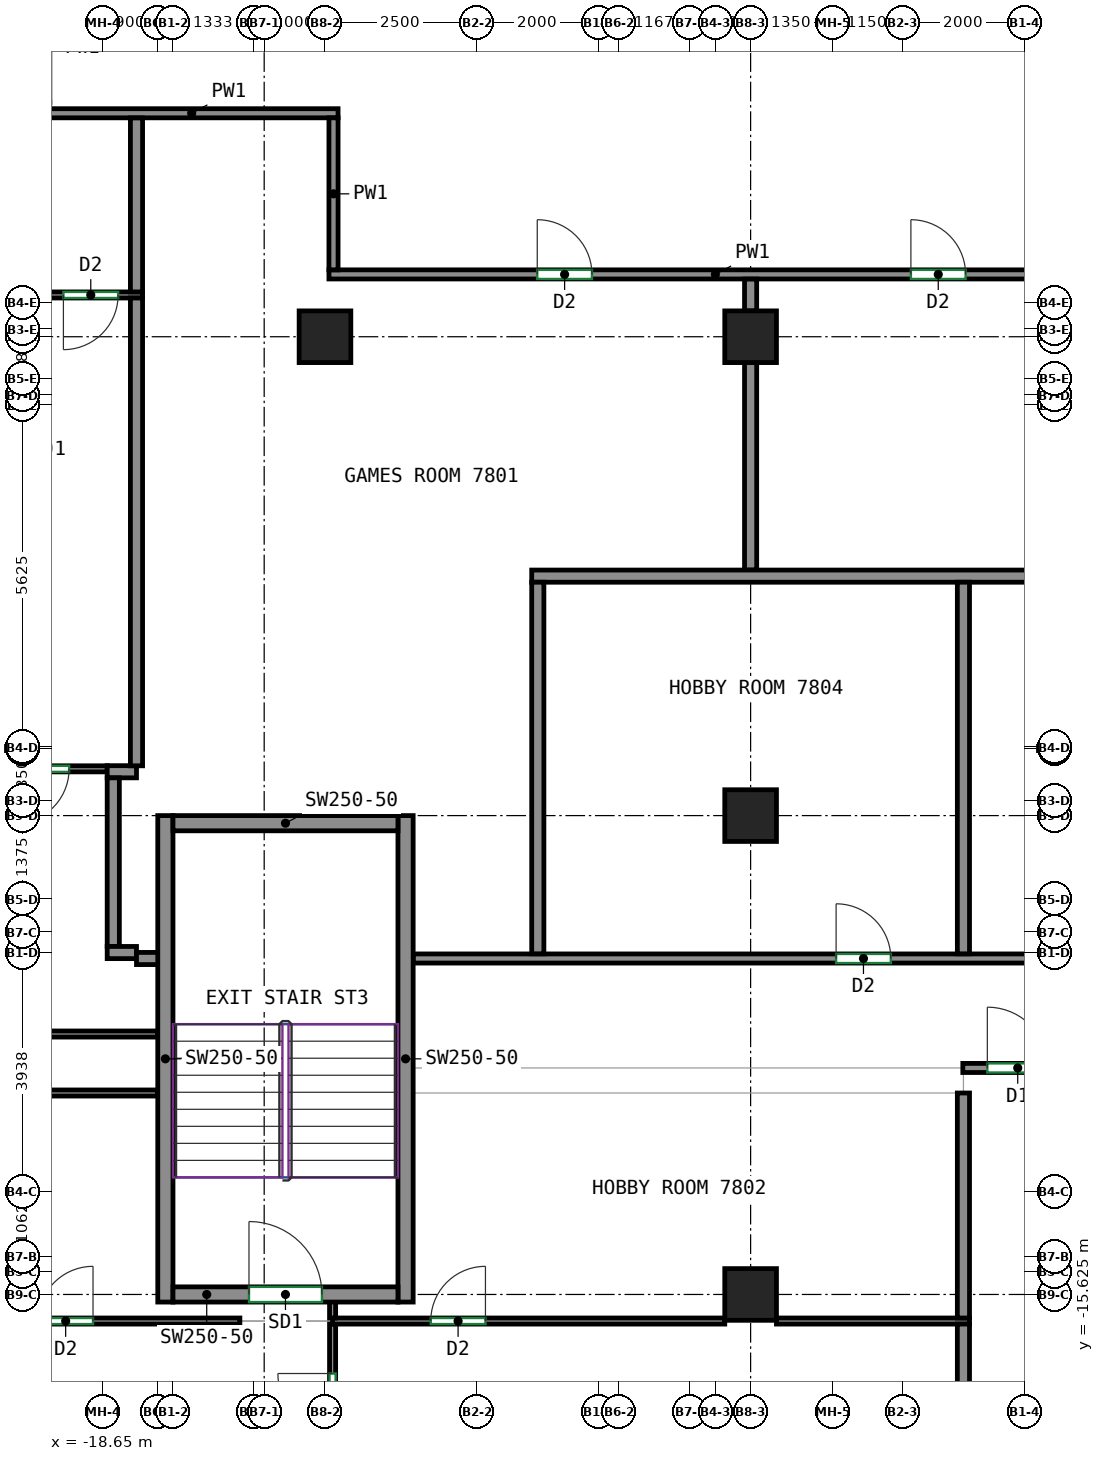
"""IFC4 building model, lengths in metres.
Left out: names, types, materials, properties, quantities, classifications, styles, units other than length and angle.
Written with IfcOpenShell. Run it as: python <this file> out.ifc"""

import sys

from ifc_helpers import new_model, si_unit, direction, frame, frame_2d, origin, origin_2d, place, context, subcontext, project, spatial, rectangle, extrude, source, transform, mapped, element, fill, save


model = new_model("IFC4")
c1 = context("Model", 3, precision=1e-05, world=origin(), true_north=direction((0.0, 1.0)))
c2 = subcontext(c1, "Body", "Model", "MODEL_VIEW")
j1 = project(units=[si_unit("LENGTHUNIT", "METRE"), si_unit("PLANEANGLEUNIT", "RADIAN")], contexts=[c1])
p1 = place(None, origin())
s1 = spatial("IfcSite", under=j1, at=p1, CompositionType="ELEMENT")
p2 = place(p1, origin())
s2 = spatial("IfcBuilding", under=s1, at=p2, CompositionType="ELEMENT")
p3 = place(p2, frame((0.0, 0.0, 312.0)))
s3 = spatial("IfcBuildingStorey", under=s2, at=p3, CompositionType="ELEMENT", Elevation=312.0)
m1 = source(origin(), c2, "Body", "SweptSolid", [
    extrude(rectangle(XDim=0.85, YDim=0.85, at=origin_2d()), origin(), (0.0, 0.0, 1.0), 3.12),
])
for number, where, z_axis, x_axis in (
    (1, (-15.0, 0.125, 0.0), (0.0, 0.0, 1.0), (1.0, 0.0, 0.0)),
    (2, (-8.0, -15.625, 0.0), (0.0, 0.0, 1.0), (1.0, 0.0, 0.0)),
    (3, (-8.0, -7.75, 0.0), (0.0, 0.0, 1.0), (1.0, 0.0, 0.0)),
    (4, (-8.0, 0.125, 0.0), (0.0, 0.0, 1.0), (1.0, 0.0, 0.0)),
):
    element("IfcColumn", number, at=place(p3, frame(where, z_axis=z_axis, x_axis=x_axis)), inside=s3, PredefinedType="COLUMN", context=c2, shape_type="MappedRepresentation", body=[
        mapped(m1, transform((0.0, 0.0, 0.0))),
    ])
m2 = source(origin(), c2, "Body", "SweptSolid", [
    extrude(rectangle(XDim=8.0, YDim=0.25, at=frame_2d((4.0, 0.0))), origin(), (0.0, 0.0, 1.0), 3.12),
])
for number, where, z_axis, x_axis in (
    (5, (-17.625, -15.75, 0.0), (0.0, 0.0, 1.0), (0.0, 1.0, 0.0)),
    (6, (-13.675, -15.75, 0.0), (0.0, 0.0, 1.0), (0.0, 1.0, 0.0)),
):
    element("IfcWall", number, at=place(p3, frame(where, z_axis=z_axis, x_axis=x_axis)), inside=s3, PredefinedType="SHEAR", context=c2, shape_type="MappedRepresentation", body=[
        mapped(m2, transform((0.0, 0.0, 0.0))),
    ])
m3 = source(origin(), c2, "Body", "SweptSolid", [
    extrude(rectangle(XDim=3.7, YDim=0.25, at=frame_2d((1.85, 0.0))), origin(), (0.0, 0.0, 1.0), 3.12),
])
p4 = place(p3, frame((-17.5, -15.625, 0.0), z_axis=(0.0, 0.0, 1.0), x_axis=(1.0, 0.0, 0.0)))
e7 = element("IfcWall", 7, at=p4, inside=s3, PredefinedType="SHEAR", context=c2, shape_type="MappedRepresentation", body=[
    mapped(m3, transform((0.0, 0.0, 0.0))),
])
p5 = place(p4, frame((1.25, 0.0, 0.0)))
e8 = element("IfcOpeningElement", 8, at=p5, cuts=e7, PredefinedType="OPENING", context=c2, shape_type="SweptSolid", body=[
    extrude(rectangle(XDim=1.2, YDim=2.1, at=frame_2d((0.6, 1.05))), frame((0.0, 0.135, 0.0), z_axis=(0.0, -1.0, 0.0), x_axis=(1.0, 0.0, 0.0)), (0.0, 0.0, 1.0), 0.27),
])
p6 = place(p3, frame((-17.5, -7.875, 0.0), z_axis=(0.0, 0.0, 1.0), x_axis=(1.0, 0.0, 0.0)))
e9 = element("IfcWall", 9, at=p6, inside=s3, PredefinedType="SHEAR", context=c2, shape_type="MappedRepresentation", body=[
    mapped(m3, transform((0.0, 0.0, 0.0))),
])
p7 = place(p3, frame((-19.6, 3.8, 0.0), z_axis=(0.0, 0.0, 1.0), x_axis=(1.0, 0.0, 0.0)))
e10 = element("IfcWall", 10, at=p7, inside=s3, PredefinedType="PARTITIONING", context=c2, shape_type="SweptSolid", body=[
    extrude(rectangle(XDim=4.815, YDim=0.15, at=frame_2d((2.408, 0.0))), origin(), (0.0, 0.0, 1.0), 3.12),
])
p8 = place(p3, frame((-4.51, -11.9, 0.0), z_axis=(0.0, 0.0, 1.0), x_axis=(1.0, 0.0, 0.0)))
e11 = element("IfcWall", 11, at=p8, inside=s3, PredefinedType="PARTITIONING", context=c2, shape_type="SweptSolid", body=[
    extrude(rectangle(XDim=22.26, YDim=0.15, at=frame_2d((11.13, 0.0))), origin(), (0.0, 0.0, 1.0), 3.12),
])
p9 = place(p8, frame((0.403, 0.0, 0.0)))
e12 = element("IfcOpeningElement", 12, at=p9, cuts=e11, PredefinedType="OPENING", context=c2, shape_type="SweptSolid", body=[
    extrude(rectangle(XDim=1.0, YDim=2.1, at=frame_2d((0.5, 1.05))), frame((0.0, 0.085, 0.0), z_axis=(0.0, -1.0, 0.0), x_axis=(1.0, 0.0, 0.0)), (0.0, 0.0, 1.0), 0.17),
])
p10 = place(p3, frame((-14.935, 1.15, 0.0), z_axis=(0.0, 0.0, 1.0), x_axis=(1.0, 0.0, 0.0)))
e13 = element("IfcWall", 13, at=p10, inside=s3, PredefinedType="PARTITIONING", context=c2, shape_type="SweptSolid", body=[
    extrude(rectangle(XDim=12.71, YDim=0.15, at=frame_2d((6.355, 0.0))), origin(), (0.0, 0.0, 1.0), 3.12),
])
p11 = place(p10, frame((3.426, 0.0, 0.0)))
e14 = element("IfcOpeningElement", 14, at=p11, cuts=e13, PredefinedType="OPENING", context=c2, shape_type="SweptSolid", body=[
    extrude(rectangle(XDim=0.9, YDim=2.1, at=frame_2d((0.45, 1.05))), frame((0.0, 0.085, 0.0), z_axis=(0.0, -1.0, 0.0), x_axis=(1.0, 0.0, 0.0)), (0.0, 0.0, 1.0), 0.17),
])
p12 = place(p10, frame((9.571, 0.0, 0.0)))
e15 = element("IfcOpeningElement", 15, at=p12, cuts=e13, PredefinedType="OPENING", context=c2, shape_type="SweptSolid", body=[
    extrude(rectangle(XDim=0.9, YDim=2.1, at=frame_2d((0.45, 1.05))), frame((0.0, 0.085, 0.0), z_axis=(0.0, -1.0, 0.0), x_axis=(1.0, 0.0, 0.0)), (0.0, 0.0, 1.0), 0.17),
])
p13 = place(p3, frame((-14.86, 3.725, 0.0), z_axis=(0.0, 0.0, 1.0), x_axis=(0.0, -1.0, 0.0)))
e16 = element("IfcWall", 16, at=p13, inside=s3, PredefinedType="PARTITIONING", context=c2, shape_type="SweptSolid", body=[
    extrude(rectangle(XDim=2.5, YDim=0.15, at=frame_2d((1.25, 0.0))), origin(), (0.0, 0.0, 1.0), 3.12),
])
p14 = place(p3, frame((-13.55, -10.1, 0.0), z_axis=(0.0, 0.0, 1.0), x_axis=(1.0, 0.0, 0.0)))
e17 = element("IfcWall", 17, at=p14, inside=s3, PredefinedType="PARTITIONING", context=c2, shape_type="SweptSolid", body=[
    extrude(rectangle(XDim=30.65, YDim=0.15, at=frame_2d((15.325, 0.0))), origin(), (0.0, 0.0, 1.0), 3.12),
])
p15 = place(p14, frame((6.956, 0.0, 0.0)))
e18 = element("IfcOpeningElement", 18, at=p15, cuts=e17, PredefinedType="OPENING", context=c2, shape_type="SweptSolid", body=[
    extrude(rectangle(XDim=0.9, YDim=2.1, at=frame_2d((0.45, 1.05))), frame((0.0, 0.085, 0.0), z_axis=(0.0, -1.0, 0.0), x_axis=(1.0, 0.0, 0.0)), (0.0, 0.0, 1.0), 0.17),
])
p16 = place(p14, frame((10.643, 0.0, 0.0)))
e19 = element("IfcOpeningElement", 19, at=p16, cuts=e17, PredefinedType="OPENING", context=c2, shape_type="SweptSolid", body=[
    extrude(rectangle(XDim=0.9, YDim=2.1, at=frame_2d((0.45, 1.05))), frame((0.0, 0.085, 0.0), z_axis=(0.0, -1.0, 0.0), x_axis=(1.0, 0.0, 0.0)), (0.0, 0.0, 1.0), 0.17),
])
p17 = place(p14, frame((24.155, 0.0, 0.0)))
e20 = element("IfcOpeningElement", 20, at=p17, cuts=e17, PredefinedType="OPENING", context=c2, shape_type="SweptSolid", body=[
    extrude(rectangle(XDim=0.9, YDim=2.1, at=frame_2d((0.45, 1.05))), frame((0.0, 0.085, 0.0), z_axis=(0.0, -1.0, 0.0), x_axis=(1.0, 0.0, 0.0)), (0.0, 0.0, 1.0), 0.17),
])
p18 = place(p3, frame((-14.875, -19.762, 0.0), z_axis=(0.0, 0.0, 1.0), x_axis=(0.0, 1.0, 0.0)))
e21 = element("IfcWall", 21, at=p18, inside=s3, PredefinedType="PARTITIONING", context=c2, shape_type="SweptSolid", body=[
    extrude(rectangle(XDim=3.65, YDim=0.1, at=frame_2d((1.825, 0.0))), origin(), (0.0, 0.0, 1.0), 3.12),
])
p19 = place(p18, frame((1.937, 0.0, 0.0)))
e22 = element("IfcOpeningElement", 22, at=p19, cuts=e21, PredefinedType="OPENING", context=c2, shape_type="SweptSolid", body=[
    extrude(rectangle(XDim=0.9, YDim=2.1, at=frame_2d((0.45, 1.05))), frame((0.0, 0.06, 0.0), z_axis=(0.0, -1.0, 0.0), x_axis=(1.0, 0.0, 0.0)), (0.0, 0.0, 1.0), 0.12),
])
p20 = place(p3, frame((-25.25, -16.062, 0.0), z_axis=(0.0, 0.0, 1.0), x_axis=(1.0, 0.0, 0.0)))
e23 = element("IfcWall", 23, at=p20, inside=s3, PredefinedType="PARTITIONING", context=c2, shape_type="SweptSolid", body=[
    extrude(rectangle(XDim=8.85, YDim=0.1, at=frame_2d((4.425, 0.0))), origin(), (0.0, 0.0, 1.0), 3.12),
])
p21 = place(p20, frame((5.535, 0.0, 0.0)))
e24 = element("IfcOpeningElement", 24, at=p21, cuts=e23, PredefinedType="OPENING", context=c2, shape_type="SweptSolid", body=[
    extrude(rectangle(XDim=0.9, YDim=2.1, at=frame_2d((0.45, 1.05))), frame((0.0, 0.06, 0.0), z_axis=(0.0, -1.0, 0.0), x_axis=(1.0, 0.0, 0.0)), (0.0, 0.0, 1.0), 0.12),
])
p22 = place(p3, frame((-7.575, -16.062, 0.0), z_axis=(0.0, 0.0, 1.0), x_axis=(1.0, 0.0, 0.0)))
e25 = element("IfcWall", 25, at=p22, inside=s3, PredefinedType="PARTITIONING", context=c2, shape_type="SweptSolid", body=[
    extrude(rectangle(XDim=3.175, YDim=0.1, at=frame_2d((1.587, 0.0))), origin(), (0.0, 0.0, 1.0), 3.12),
])
p23 = place(p3, frame((-14.875, -16.062, 0.0), z_axis=(0.0, 0.0, 1.0), x_axis=(1.0, 0.0, 0.0)))
e26 = element("IfcWall", 26, at=p23, inside=s3, PredefinedType="PARTITIONING", context=c2, shape_type="SweptSolid", body=[
    extrude(rectangle(XDim=6.45, YDim=0.1, at=frame_2d((3.225, 0.0))), origin(), (0.0, 0.0, 1.0), 3.12),
])
p24 = place(p23, frame((1.614, 0.0, 0.0)))
e27 = element("IfcOpeningElement", 27, at=p24, cuts=e26, PredefinedType="OPENING", context=c2, shape_type="SweptSolid", body=[
    extrude(rectangle(XDim=0.9, YDim=2.1, at=frame_2d((0.45, 1.05))), frame((0.0, 0.06, 0.0), z_axis=(0.0, -1.0, 0.0), x_axis=(1.0, 0.0, 0.0)), (0.0, 0.0, 1.0), 0.12),
])
p25 = place(p3, frame((-4.5, -19.762, 0.0), z_axis=(0.0, 0.0, 1.0), x_axis=(0.0, 1.0, 0.0)))
e28 = element("IfcWall", 28, at=p25, inside=s3, PredefinedType="PARTITIONING", context=c2, shape_type="SweptSolid", body=[
    extrude(rectangle(XDim=3.65, YDim=0.2, at=frame_2d((1.825, 0.0))), origin(), (0.0, 0.0, 1.0), 3.12),
])
p26 = place(p3, frame((-14.875, -16.012, 0.0), z_axis=(0.0, 0.0, 1.0), x_axis=(0.0, 1.0, 0.0)))
e29 = element("IfcWall", 29, at=p26, inside=s3, PredefinedType="PARTITIONING", context=c2, shape_type="SweptSolid", body=[
    extrude(rectangle(XDim=0.312, YDim=0.1, at=frame_2d((0.156, 0.0))), origin(), (0.0, 0.0, 1.0), 3.12),
])
p27 = place(p3, frame((-17.75, -12.312, 0.0), z_axis=(0.0, 0.0, 1.0), x_axis=(-1.0, 0.0, 0.0)))
e30 = element("IfcWall", 30, at=p27, inside=s3, PredefinedType="PARTITIONING", context=c2, shape_type="SweptSolid", body=[
    extrude(rectangle(XDim=7.5, YDim=0.1, at=frame_2d((3.75, 0.0))), origin(), (0.0, 0.0, 1.0), 3.12),
])
p28 = place(p27, frame((5.08, 0.0, 0.0)))
e31 = element("IfcOpeningElement", 31, at=p28, cuts=e30, PredefinedType="OPENING", context=c2, shape_type="SweptSolid", body=[
    extrude(rectangle(XDim=1.0, YDim=2.1, at=frame_2d((0.5, 1.05))), frame((0.0, 0.06, 0.0), z_axis=(0.0, -1.0, 0.0), x_axis=(1.0, 0.0, 0.0)), (0.0, 0.0, 1.0), 0.12),
])
p29 = place(p3, frame((-4.5, -16.012, 0.0), z_axis=(0.0, 0.0, 1.0), x_axis=(0.0, 1.0, 0.0)))
e32 = element("IfcWall", 32, at=p29, inside=s3, PredefinedType="PARTITIONING", context=c2, shape_type="SweptSolid", body=[
    extrude(rectangle(XDim=3.7, YDim=0.2, at=frame_2d((1.85, 0.0))), origin(), (0.0, 0.0, 1.0), 3.12),
])
p30 = place(p3, frame((-17.75, -11.342, 0.0), z_axis=(0.0, 0.0, 1.0), x_axis=(-1.0, 0.0, 0.0)))
e33 = element("IfcWall", 33, at=p30, inside=s3, PredefinedType="PARTITIONING", context=c2, shape_type="SweptSolid", body=[
    extrude(rectangle(XDim=7.5, YDim=0.1, at=frame_2d((3.75, 0.0))), origin(), (0.0, 0.0, 1.0), 3.12),
])
p31 = place(p30, frame((3.757, 0.0, 0.0)))
e34 = element("IfcOpeningElement", 34, at=p31, cuts=e33, PredefinedType="OPENING", context=c2, shape_type="SweptSolid", body=[
    extrude(rectangle(XDim=0.9, YDim=2.1, at=frame_2d((0.45, 1.05))), frame((0.0, 0.06, 0.0), z_axis=(0.0, -1.0, 0.0), x_axis=(1.0, 0.0, 0.0)), (0.0, 0.0, 1.0), 0.12),
])
p32 = place(p3, frame((-18.582, -6.981, 0.0), z_axis=(0.0, 0.0, 1.0), x_axis=(-1.0, 0.0, 0.0)))
e35 = element("IfcWall", 35, at=p32, inside=s3, PredefinedType="PARTITIONING", context=c2, shape_type="SweptSolid", body=[
    extrude(rectangle(XDim=6.668, YDim=0.1, at=frame_2d((3.334, 0.0))), origin(), (0.0, 0.0, 1.0), 3.12),
])
p33 = place(p32, frame((0.626, 0.0, 0.0)))
e36 = element("IfcOpeningElement", 36, at=p33, cuts=e35, PredefinedType="OPENING", context=c2, shape_type="SweptSolid", body=[
    extrude(rectangle(XDim=0.9, YDim=2.1, at=frame_2d((0.45, 1.05))), frame((0.0, 0.06, 0.0), z_axis=(0.0, -1.0, 0.0), x_axis=(1.0, 0.0, 0.0)), (0.0, 0.0, 1.0), 0.12),
])
p34 = place(p3, frame((-18.582, -7.029, 0.0), z_axis=(0.0, 0.0, 1.0), x_axis=(1.0, 0.0, 0.0)))
e37 = element("IfcWall", 37, at=p34, inside=s3, PredefinedType="PARTITIONING", context=c2, shape_type="SweptSolid", body=[
    extrude(rectangle(XDim=0.482, YDim=0.2, at=frame_2d((0.241, 0.0))), origin(), (0.0, 0.0, 1.0), 3.12),
])
p35 = place(p3, frame((-18.482, -9.902, 0.0), z_axis=(0.0, 0.0, 1.0), x_axis=(0.0, 1.0, 0.0)))
e38 = element("IfcWall", 38, at=p35, inside=s3, PredefinedType="PARTITIONING", context=c2, shape_type="SweptSolid", body=[
    extrude(rectangle(XDim=2.773, YDim=0.2, at=frame_2d((1.387, 0.0))), origin(), (0.0, 0.0, 1.0), 3.12),
])
p36 = place(p3, frame((-18.1, -10.002, 0.0), z_axis=(0.0, 0.0, 1.0), x_axis=(-1.0, 0.0, 0.0)))
e39 = element("IfcWall", 39, at=p36, inside=s3, PredefinedType="PARTITIONING", context=c2, shape_type="SweptSolid", body=[
    extrude(rectangle(XDim=0.482, YDim=0.2, at=frame_2d((0.241, 0.0))), origin(), (0.0, 0.0, 1.0), 3.12),
])
p37 = place(p3, frame((-17.7, -10.1, 0.0), z_axis=(0.0, 0.0, 1.0), x_axis=(-1.0, 0.0, 0.0)))
e40 = element("IfcWall", 40, at=p37, inside=s3, PredefinedType="PARTITIONING", context=c2, shape_type="SweptSolid", body=[
    extrude(rectangle(XDim=0.4, YDim=0.2, at=frame_2d((0.2, 0.0))), origin(), (0.0, 0.0, 1.0), 3.12),
])
p38 = place(p3, frame((-18.0, 0.812, 0.0), z_axis=(0.0, 0.0, 1.0), x_axis=(-1.0, 0.0, 0.0)))
e41 = element("IfcWall", 41, at=p38, inside=s3, PredefinedType="PARTITIONING", context=c2, shape_type="SweptSolid", body=[
    extrude(rectangle(XDim=7.25, YDim=0.1, at=frame_2d((3.625, 0.0))), origin(), (0.0, 0.0, 1.0), 3.12),
])
p39 = place(p38, frame((0.402, 0.0, 0.0)))
e42 = element("IfcOpeningElement", 42, at=p39, cuts=e41, PredefinedType="OPENING", context=c2, shape_type="SweptSolid", body=[
    extrude(rectangle(XDim=0.9, YDim=2.1, at=frame_2d((0.45, 1.05))), frame((0.0, 0.06, 0.0), z_axis=(0.0, -1.0, 0.0), x_axis=(1.0, 0.0, 0.0)), (0.0, 0.0, 1.0), 0.12),
])
p40 = place(p3, frame((-18.1, -6.931, 0.0), z_axis=(0.0, 0.0, 1.0), x_axis=(0.0, 1.0, 0.0)))
e43 = element("IfcWall", 43, at=p40, inside=s3, PredefinedType="PARTITIONING", context=c2, shape_type="SweptSolid", body=[
    extrude(rectangle(XDim=7.693, YDim=0.2, at=frame_2d((3.846, 0.0))), origin(), (0.0, 0.0, 1.0), 3.12),
])
p41 = place(p3, frame((-18.1, 0.862, 0.0), z_axis=(0.0, 0.0, 1.0), x_axis=(0.0, 1.0, 0.0)))
e44 = element("IfcWall", 44, at=p41, inside=s3, PredefinedType="PARTITIONING", context=c2, shape_type="SweptSolid", body=[
    extrude(rectangle(XDim=2.861, YDim=0.2, at=frame_2d((1.43, 0.0))), origin(), (0.0, 0.0, 1.0), 3.12),
])
p42 = place(p3, frame((-8.0, 0.55, 0.0), z_axis=(0.0, 0.0, 1.0), x_axis=(0.0, 1.0, 0.0)))
e45 = element("IfcWall", 45, at=p42, inside=s3, PredefinedType="PARTITIONING", context=c2, shape_type="SweptSolid", body=[
    extrude(rectangle(XDim=0.523, YDim=0.2, at=frame_2d((0.261, 0.0))), origin(), (0.0, 0.0, 1.0), 3.12),
])
p43 = place(p3, frame((-8.0, -3.712, 0.0), z_axis=(0.0, 0.0, 1.0), x_axis=(0.0, 1.0, 0.0)))
e46 = element("IfcWall", 46, at=p43, inside=s3, PredefinedType="PARTITIONING", context=c2, shape_type="SweptSolid", body=[
    extrude(rectangle(XDim=3.412, YDim=0.2, at=frame_2d((1.706, 0.0))), origin(), (0.0, 0.0, 1.0), 3.12),
])
p44 = place(p3, frame((-11.6, -3.812, 0.0), z_axis=(0.0, 0.0, 1.0), x_axis=(1.0, 0.0, 0.0)))
e47 = element("IfcWall", 47, at=p44, inside=s3, PredefinedType="PARTITIONING", context=c2, shape_type="SweptSolid", body=[
    extrude(rectangle(XDim=28.2, YDim=0.2, at=frame_2d((14.1, 0.0))), origin(), (0.0, 0.0, 1.0), 3.12),
])
for number, where, z_axis, x_axis in (
    (48, (-11.5, -10.023, 0.0), (0.0, 0.0, 1.0), (0.0, 1.0, 0.0)),
    (49, (-4.5, -10.023, 0.0), (0.0, 0.0, 1.0), (0.0, 1.0, 0.0)),
):
    element("IfcWall", number, at=place(p3, frame(where, z_axis=z_axis, x_axis=x_axis)), inside=s3, PredefinedType="PARTITIONING", context=c2, shape_type="SweptSolid", body=[
        extrude(rectangle(XDim=6.111, YDim=0.2, at=frame_2d((3.055, 0.0))), origin(), (0.0, 0.0, 1.0), 3.12),
    ])
p45 = place(p5, origin())
e50 = element("IfcDoor", 50, at=p45, inside=s3, OperationType="DOUBLE_DOOR_SINGLE_SWING", PredefinedType="DOOR", context=c2, shape_type="SweptSolid", body=[
    extrude(rectangle(XDim=1.2, YDim=2.1, at=frame_2d((0.6, 1.05))), frame((0.0, 0.025, 0.0), z_axis=(0.0, -1.0, 0.0), x_axis=(1.0, 0.0, 0.0)), (0.0, 0.0, 1.0), 0.05),
])
fill(e8, e50)
p46 = place(p19, origin())
e51 = element("IfcDoor", 51, at=p46, inside=s3, OperationType="SINGLE_SWING_RIGHT", PredefinedType="DOOR", context=c2, shape_type="SweptSolid", body=[
    extrude(rectangle(XDim=0.9, YDim=2.1, at=frame_2d((0.45, 1.05))), frame((0.0, 0.025, 0.0), z_axis=(0.0, -1.0, 0.0), x_axis=(1.0, 0.0, 0.0)), (0.0, 0.0, 1.0), 0.05),
])
fill(e22, e51)
p47 = place(p21, origin())
e52 = element("IfcDoor", 52, at=p47, inside=s3, OperationType="SINGLE_SWING_RIGHT", PredefinedType="DOOR", context=c2, shape_type="SweptSolid", body=[
    extrude(rectangle(XDim=0.9, YDim=2.1, at=frame_2d((0.45, 1.05))), frame((0.0, 0.025, 0.0), z_axis=(0.0, -1.0, 0.0), x_axis=(1.0, 0.0, 0.0)), (0.0, 0.0, 1.0), 0.05),
])
fill(e24, e52)
p48 = place(p24, origin())
e53 = element("IfcDoor", 53, at=p48, inside=s3, OperationType="SINGLE_SWING_RIGHT", PredefinedType="DOOR", context=c2, shape_type="SweptSolid", body=[
    extrude(rectangle(XDim=0.9, YDim=2.1, at=frame_2d((0.45, 1.05))), frame((0.0, 0.025, 0.0), z_axis=(0.0, -1.0, 0.0), x_axis=(1.0, 0.0, 0.0)), (0.0, 0.0, 1.0), 0.05),
])
fill(e27, e53)
p49 = place(p9, origin())
e54 = element("IfcDoor", 54, at=p49, inside=s3, OperationType="SINGLE_SWING_LEFT", PredefinedType="DOOR", context=c2, shape_type="SweptSolid", body=[
    extrude(rectangle(XDim=1.0, YDim=2.1, at=frame_2d((0.5, 1.05))), frame((0.0, 0.025, 0.0), z_axis=(0.0, -1.0, 0.0), x_axis=(1.0, 0.0, 0.0)), (0.0, 0.0, 1.0), 0.05),
])
fill(e12, e54)
p50 = place(p15, origin())
e55 = element("IfcDoor", 55, at=p50, inside=s3, OperationType="SINGLE_SWING_LEFT", PredefinedType="DOOR", context=c2, shape_type="SweptSolid", body=[
    extrude(rectangle(XDim=0.9, YDim=2.1, at=frame_2d((0.45, 1.05))), frame((0.0, 0.025, 0.0), z_axis=(0.0, -1.0, 0.0), x_axis=(1.0, 0.0, 0.0)), (0.0, 0.0, 1.0), 0.05),
])
fill(e18, e55)
p51 = place(p33, origin())
e56 = element("IfcDoor", 56, at=p51, inside=s3, OperationType="SINGLE_SWING_RIGHT", PredefinedType="DOOR", context=c2, shape_type="SweptSolid", body=[
    extrude(rectangle(XDim=0.9, YDim=2.1, at=frame_2d((0.45, 1.05))), frame((0.0, 0.025, 0.0), z_axis=(0.0, -1.0, 0.0), x_axis=(1.0, 0.0, 0.0)), (0.0, 0.0, 1.0), 0.05),
])
fill(e36, e56)
p52 = place(p39, origin())
e57 = element("IfcDoor", 57, at=p52, inside=s3, OperationType="SINGLE_SWING_RIGHT", PredefinedType="DOOR", context=c2, shape_type="SweptSolid", body=[
    extrude(rectangle(XDim=0.9, YDim=2.1, at=frame_2d((0.45, 1.05))), frame((0.0, 0.025, 0.0), z_axis=(0.0, -1.0, 0.0), x_axis=(1.0, 0.0, 0.0)), (0.0, 0.0, 1.0), 0.05),
])
fill(e42, e57)
p53 = place(p11, origin())
e58 = element("IfcDoor", 58, at=p53, inside=s3, OperationType="SINGLE_SWING_LEFT", PredefinedType="DOOR", context=c2, shape_type="SweptSolid", body=[
    extrude(rectangle(XDim=0.9, YDim=2.1, at=frame_2d((0.45, 1.05))), frame((0.0, 0.025, 0.0), z_axis=(0.0, -1.0, 0.0), x_axis=(1.0, 0.0, 0.0)), (0.0, 0.0, 1.0), 0.05),
])
fill(e14, e58)
p54 = place(p12, origin())
e59 = element("IfcDoor", 59, at=p54, inside=s3, OperationType="SINGLE_SWING_LEFT", PredefinedType="DOOR", context=c2, shape_type="SweptSolid", body=[
    extrude(rectangle(XDim=0.9, YDim=2.1, at=frame_2d((0.45, 1.05))), frame((0.0, 0.025, 0.0), z_axis=(0.0, -1.0, 0.0), x_axis=(1.0, 0.0, 0.0)), (0.0, 0.0, 1.0), 0.05),
])
fill(e15, e59)
save(model, sys.argv[1])
